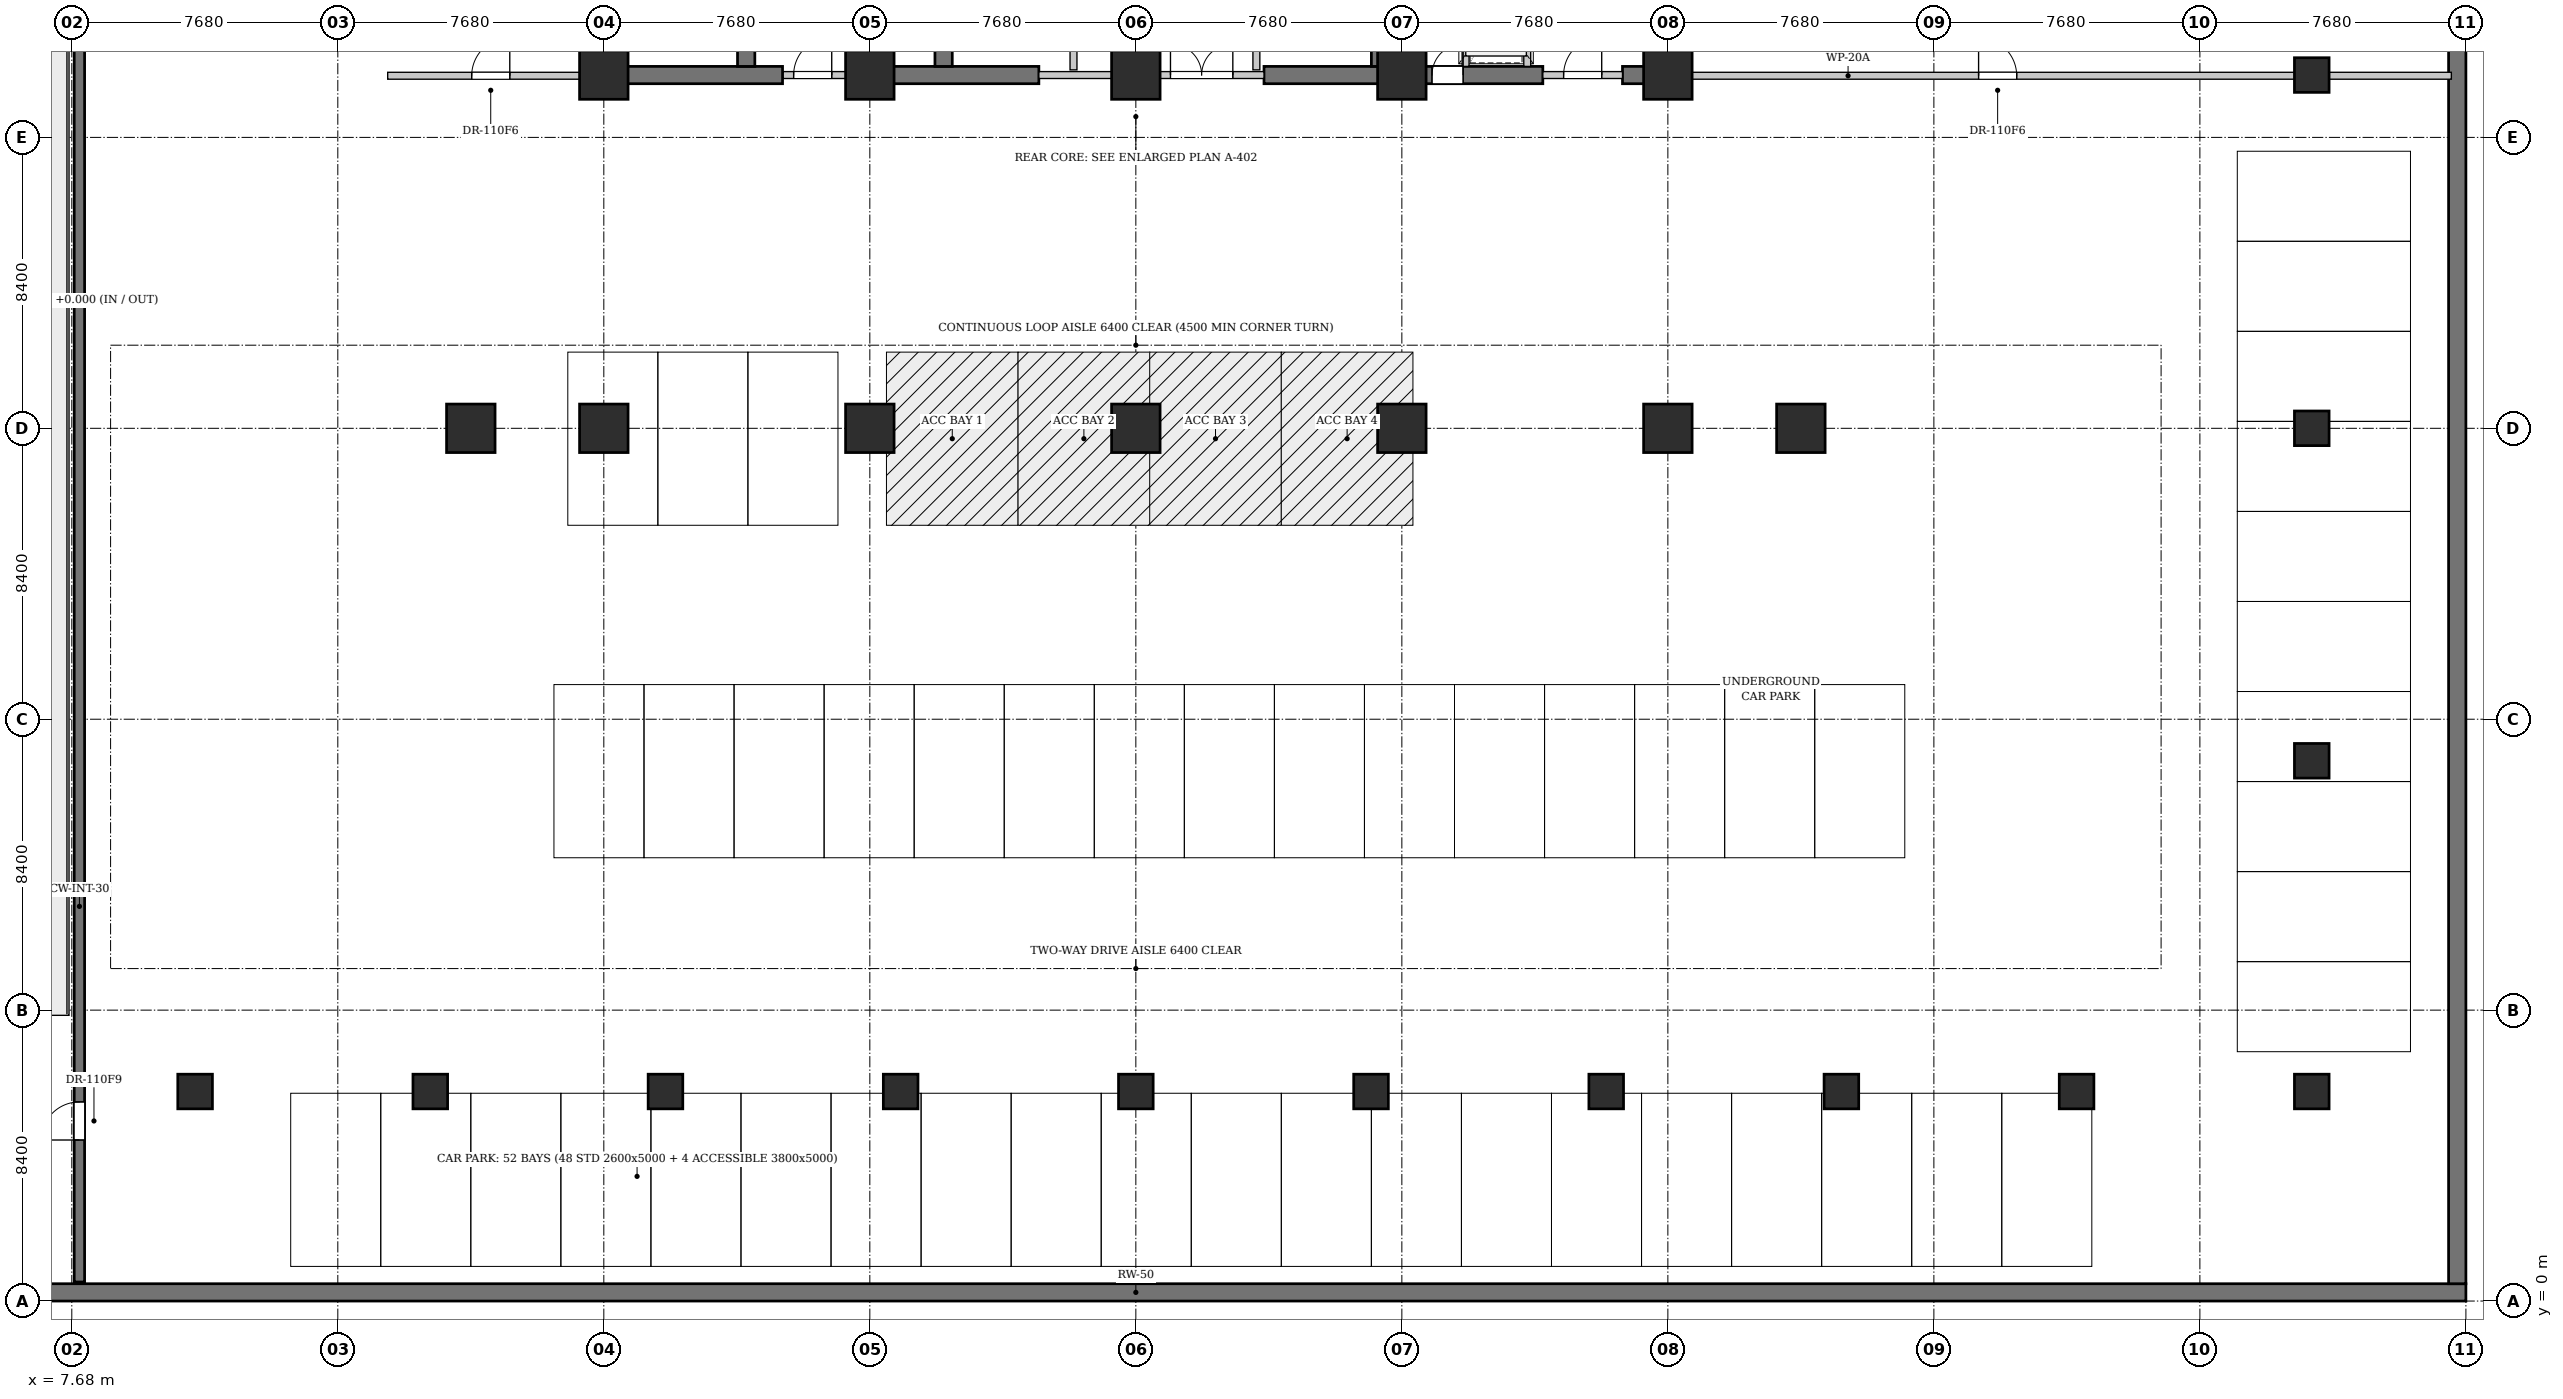
"""IFC4 building model, lengths in metres.
Left out: names, types, materials, properties, quantities, classifications, styles, units other than length and angle.
Written with IfcOpenShell. Run it as: python <this file> out.ifc"""

import sys

from ifc_helpers import new_model, si_unit, direction, frame, frame_2d, origin, origin_2d, place, context, subcontext, project, spatial, rectangle, extrude, element, fill, save


model = new_model("IFC4")
c1 = context("Model", 3, precision=1e-05, world=origin(), true_north=direction((0.0, 1.0)))
c2 = subcontext(c1, "Body", "Model", "MODEL_VIEW")
j1 = project(units=[si_unit("LENGTHUNIT", "METRE"), si_unit("PLANEANGLEUNIT", "RADIAN")], contexts=[c1])
p1 = place(None, origin())
s1 = spatial("IfcSite", under=j1, at=p1, CompositionType="ELEMENT")
p2 = place(p1, origin())
s2 = spatial("IfcBuilding", under=s1, at=p2, CompositionType="ELEMENT")
p3 = place(p2, frame((0.0, 0.0, -5.0)))
s3 = spatial("IfcBuildingStorey", under=s2, at=p3, CompositionType="ELEMENT", Elevation=-5.0)
p4 = place(p3, frame((0.0, 0.25, 0.0), z_axis=(0.0, 0.0, 1.0), x_axis=(1.0, 0.0, 0.0)))
e1 = element("IfcWall", 1, at=p4, inside=s3, PredefinedType="USERDEFINED", context=c2, shape_type="SweptSolid", body=[
    extrude(rectangle(XDim=76.8, YDim=0.5, at=frame_2d((38.4, 0.0))), origin(), (0.0, 0.0, 1.0), 4.65),
])
p5 = place(p3, frame((76.55, 0.5, 0.0), z_axis=(0.0, 0.0, 1.0), x_axis=(0.0, 1.0, 0.0)))
e2 = element("IfcWall", 2, at=p5, inside=s3, PredefinedType="USERDEFINED", context=c2, shape_type="SweptSolid", body=[
    extrude(rectangle(XDim=49.4, YDim=0.5, at=frame_2d((24.7, 0.0))), origin(), (0.0, 0.0, 1.0), 4.65),
])
p6 = place(p3, frame((22.79, 35.4, 0.0), z_axis=(0.0, 0.0, 1.0), x_axis=(1.0, 0.0, 0.0)))
e3 = element("IfcWall", 3, at=p6, inside=s3, PredefinedType="SHEAR", context=c2, shape_type="SweptSolid", body=[
    extrude(rectangle(XDim=5.41, YDim=0.5, at=frame_2d((2.705, 0.0))), origin(), (0.0, 0.0, 1.0), 4.65),
])
p7 = place(p3, frame((30.72, 35.4, 0.0), z_axis=(0.0, 0.0, 1.0), x_axis=(1.0, 0.0, 0.0)))
e4 = element("IfcWall", 4, at=p7, inside=s3, PredefinedType="SHEAR", context=c2, shape_type="SweptSolid", body=[
    extrude(rectangle(XDim=4.88, YDim=0.5, at=frame_2d((2.44, 0.0))), origin(), (0.0, 0.0, 1.0), 4.65),
])
p8 = place(p3, frame((42.1, 35.4, 0.0), z_axis=(0.0, 0.0, 1.0), x_axis=(1.0, 0.0, 0.0)))
e5 = element("IfcWall", 5, at=p8, inside=s3, PredefinedType="SHEAR", context=c2, shape_type="SweptSolid", body=[
    extrude(rectangle(XDim=8.05, YDim=0.5, at=frame_2d((4.025, 0.0))), origin(), (0.0, 0.0, 1.0), 4.65),
])
p9 = place(p8, frame((4.85, 0.0, 0.0)))
e6 = element("IfcOpeningElement", 6, at=p9, cuts=e5, PredefinedType="OPENING", context=c2, shape_type="SweptSolid", body=[
    extrude(rectangle(XDim=0.9, YDim=2.15, at=frame_2d((0.45, 1.075))), frame((0.0, 0.26, 0.0), z_axis=(0.0, -1.0, 0.0), x_axis=(1.0, 0.0, 0.0)), (0.0, 0.0, 1.0), 0.52),
])
p10 = place(p3, frame((52.45, 35.4, 0.0), z_axis=(0.0, 0.0, 1.0), x_axis=(1.0, 0.0, 0.0)))
e7 = element("IfcWall", 7, at=p10, inside=s3, PredefinedType="SHEAR", context=c2, shape_type="SweptSolid", body=[
    extrude(rectangle(XDim=1.56, YDim=0.5, at=frame_2d((0.78, 0.0))), origin(), (0.0, 0.0, 1.0), 4.65),
])
p11 = place(p3, frame((23.04, 35.65, 0.0), z_axis=(0.0, 0.0, 1.0), x_axis=(0.0, 1.0, 0.0)))
e8 = element("IfcWall", 8, at=p11, inside=s3, PredefinedType="SHEAR", context=c2, shape_type="SweptSolid", body=[
    extrude(rectangle(XDim=10.3, YDim=0.5, at=frame_2d((5.15, 0.0))), origin(), (0.0, 0.0, 1.0), 4.65),
])
p12 = place(p3, frame((27.15, 35.65, 0.0), z_axis=(0.0, 0.0, 1.0), x_axis=(0.0, 1.0, 0.0)))
e9 = element("IfcWall", 9, at=p12, inside=s3, PredefinedType="SHEAR", context=c2, shape_type="SweptSolid", body=[
    extrude(rectangle(XDim=10.3, YDim=0.5, at=frame_2d((5.15, 0.0))), origin(), (0.0, 0.0, 1.0), 4.65),
])
p13 = place(p12, frame((0.65, 0.0, 0.0)))
e10 = element("IfcOpeningElement", 10, at=p13, cuts=e9, PredefinedType="OPENING", context=c2, shape_type="SweptSolid", body=[
    extrude(rectangle(XDim=1.1, YDim=2.15, at=frame_2d((0.55, 1.075))), frame((0.0, 0.26, 0.0), z_axis=(0.0, -1.0, 0.0), x_axis=(1.0, 0.0, 0.0)), (0.0, 0.0, 1.0), 0.52),
])
for number, where, z_axis, x_axis in (
    (11, (32.85, 35.65, 0.0), (0.0, 0.0, 1.0), (0.0, 1.0, 0.0)),
    (12, (45.45, 35.65, 0.0), (0.0, 0.0, 1.0), (0.0, 1.0, 0.0)),
    (13, (53.76, 35.65, 0.0), (0.0, 0.0, 1.0), (0.0, 1.0, 0.0)),
):
    element("IfcWall", number, at=place(p3, frame(where, z_axis=z_axis, x_axis=x_axis)), inside=s3, PredefinedType="SHEAR", context=c2, shape_type="SweptSolid", body=[
        extrude(rectangle(XDim=10.3, YDim=0.5, at=frame_2d((5.15, 0.0))), origin(), (0.0, 0.0, 1.0), 4.65),
    ])
p14 = place(p3, frame((7.9, 0.55, 0.0), z_axis=(0.0, 0.0, 1.0), x_axis=(0.0, 1.0, 0.0)))
e14 = element("IfcWall", 14, at=p14, inside=s3, PredefinedType="SHEAR", context=c2, shape_type="SweptSolid", body=[
    extrude(rectangle(XDim=49.3, YDim=0.3, at=frame_2d((24.65, 0.0))), origin(), (0.0, 0.0, 1.0), 4.65),
])
p15 = place(p14, frame((4.1, 0.0, 0.0)))
e15 = element("IfcOpeningElement", 15, at=p15, cuts=e14, PredefinedType="OPENING", context=c2, shape_type="SweptSolid", body=[
    extrude(rectangle(XDim=1.1, YDim=2.15, at=frame_2d((0.55, 1.075))), frame((0.0, 0.16, 0.0), z_axis=(0.0, -1.0, 0.0), x_axis=(1.0, 0.0, 0.0)), (0.0, 0.0, 1.0), 0.32),
])
for number, where, z_axis, x_axis in (
    (16, (23.04, 35.4, 0.0), (0.0, 0.0, 1.0), (1.0, 0.0, 0.0)),
    (17, (23.04, 25.2, 0.0), (0.0, 0.0, 1.0), (1.0, 0.0, 0.0)),
    (18, (30.72, 35.4, 0.0), (0.0, 0.0, 1.0), (1.0, 0.0, 0.0)),
    (19, (30.72, 25.2, 0.0), (0.0, 0.0, 1.0), (1.0, 0.0, 0.0)),
    (20, (38.4, 35.4, 0.0), (0.0, 0.0, 1.0), (1.0, 0.0, 0.0)),
    (21, (38.4, 25.2, 0.0), (0.0, 0.0, 1.0), (1.0, 0.0, 0.0)),
    (22, (46.08, 35.4, 0.0), (0.0, 0.0, 1.0), (1.0, 0.0, 0.0)),
    (23, (46.08, 25.2, 0.0), (0.0, 0.0, 1.0), (1.0, 0.0, 0.0)),
    (24, (53.76, 35.4, 0.0), (0.0, 0.0, 1.0), (1.0, 0.0, 0.0)),
    (25, (53.76, 25.2, 0.0), (0.0, 0.0, 1.0), (1.0, 0.0, 0.0)),
    (26, (19.2, 25.2, 0.0), (0.0, 0.0, 1.0), (1.0, 0.0, 0.0)),
    (27, (57.6, 25.2, 0.0), (0.0, 0.0, 1.0), (1.0, 0.0, 0.0)),
):
    element("IfcColumn", number, at=place(p3, frame(where, z_axis=z_axis, x_axis=x_axis)), inside=s3, PredefinedType="COLUMN", context=c2, shape_type="SweptSolid", body=[
        extrude(rectangle(XDim=1.4, YDim=1.4, at=origin_2d()), origin(), (0.0, 0.0, 1.0), 5.0),
    ])
for number, where, z_axis, x_axis in (
    (28, (11.24, 6.05, 0.0), (0.0, 0.0, 1.0), (1.0, 0.0, 0.0)),
    (29, (18.03, 6.05, 0.0), (0.0, 0.0, 1.0), (1.0, 0.0, 0.0)),
    (30, (24.82, 6.05, 0.0), (0.0, 0.0, 1.0), (1.0, 0.0, 0.0)),
    (31, (31.61, 6.05, 0.0), (0.0, 0.0, 1.0), (1.0, 0.0, 0.0)),
    (32, (38.4, 6.05, 0.0), (0.0, 0.0, 1.0), (1.0, 0.0, 0.0)),
    (33, (45.19, 6.05, 0.0), (0.0, 0.0, 1.0), (1.0, 0.0, 0.0)),
    (34, (51.98, 6.05, 0.0), (0.0, 0.0, 1.0), (1.0, 0.0, 0.0)),
    (35, (58.77, 6.05, 0.0), (0.0, 0.0, 1.0), (1.0, 0.0, 0.0)),
    (36, (65.56, 6.05, 0.0), (0.0, 0.0, 1.0), (1.0, 0.0, 0.0)),
    (37, (72.35, 6.05, 0.0), (0.0, 0.0, 1.0), (1.0, 0.0, 0.0)),
    (38, (72.35, 15.6, 0.0), (0.0, 0.0, 1.0), (1.0, 0.0, 0.0)),
    (39, (72.35, 25.2, 0.0), (0.0, 0.0, 1.0), (1.0, 0.0, 0.0)),
    (40, (72.35, 35.4, 0.0), (0.0, 0.0, 1.0), (1.0, 0.0, 0.0)),
):
    element("IfcColumn", number, at=place(p3, frame(where, z_axis=z_axis, x_axis=x_axis)), inside=s3, PredefinedType="COLUMN", context=c2, shape_type="SweptSolid", body=[
        extrude(rectangle(XDim=1.0, YDim=1.0, at=origin_2d()), origin(), (0.0, 0.0, 1.0), 5.0),
    ])
p16 = place(p3, frame((28.22, 35.4, 0.0), z_axis=(0.0, 0.0, 1.0), x_axis=(1.0, 0.0, 0.0)))
e41 = element("IfcWall", 41, at=p16, inside=s3, PredefinedType="PARTITIONING", context=c2, shape_type="SweptSolid", body=[
    extrude(rectangle(XDim=2.5, YDim=0.2, at=frame_2d((1.25, 0.0))), origin(), (0.0, 0.0, 1.0), 3.845),
])
p17 = place(p16, frame((0.3, 0.0, 0.0)))
e42 = element("IfcOpeningElement", 42, at=p17, cuts=e41, PredefinedType="OPENING", context=c2, shape_type="SweptSolid", body=[
    extrude(rectangle(XDim=1.1, YDim=2.15, at=frame_2d((0.55, 1.075))), frame((0.0, 0.11, 0.0), z_axis=(0.0, -1.0, 0.0), x_axis=(1.0, 0.0, 0.0)), (0.0, 0.0, 1.0), 0.22),
])
p18 = place(p3, frame((35.6, 35.4, 0.0), z_axis=(0.0, 0.0, 1.0), x_axis=(1.0, 0.0, 0.0)))
e43 = element("IfcWall", 43, at=p18, inside=s3, PredefinedType="PARTITIONING", context=c2, shape_type="SweptSolid", body=[
    extrude(rectangle(XDim=6.5, YDim=0.2, at=frame_2d((3.25, 0.0))), origin(), (0.0, 0.0, 1.0), 3.845),
])
p19 = place(p18, frame((3.8, 0.0, 0.0)))
e44 = element("IfcOpeningElement", 44, at=p19, cuts=e43, PredefinedType="OPENING", context=c2, shape_type="SweptSolid", body=[
    extrude(rectangle(XDim=1.8, YDim=2.3, at=frame_2d((0.9, 1.15))), frame((0.0, 0.11, 0.0), z_axis=(0.0, -1.0, 0.0), x_axis=(1.0, 0.0, 0.0)), (0.0, 0.0, 1.0), 0.22),
])
p20 = place(p3, frame((36.6, 35.55, 0.0), z_axis=(0.0, 0.0, 1.0), x_axis=(0.0, 1.0, 0.0)))
e45 = element("IfcWall", 45, at=p20, inside=s3, PredefinedType="PARTITIONING", context=c2, shape_type="SweptSolid", body=[
    extrude(rectangle(XDim=10.37, YDim=0.2, at=frame_2d((5.185, 0.0))), origin(), (0.0, 0.0, 1.0), 4.65),
])
p21 = place(p3, frame((41.88, 35.55, 0.0), z_axis=(0.0, 0.0, 1.0), x_axis=(0.0, 1.0, 0.0)))
e46 = element("IfcWall", 46, at=p21, inside=s3, PredefinedType="PARTITIONING", context=c2, shape_type="SweptSolid", body=[
    extrude(rectangle(XDim=7.1, YDim=0.2, at=frame_2d((3.55, 0.0))), origin(), (0.0, 0.0, 1.0), 4.65),
])
p22 = place(p21, frame((2.8, 0.0, 0.0)))
e47 = element("IfcOpeningElement", 47, at=p22, cuts=e46, PredefinedType="OPENING", context=c2, shape_type="SweptSolid", body=[
    extrude(rectangle(XDim=0.9, YDim=2.15, at=frame_2d((0.45, 1.075))), frame((0.0, 0.11, 0.0), z_axis=(0.0, -1.0, 0.0), x_axis=(1.0, 0.0, 0.0)), (0.0, 0.0, 1.0), 0.22),
])
p23 = place(p3, frame((50.15, 35.4, 0.0), z_axis=(0.0, 0.0, 1.0), x_axis=(1.0, 0.0, 0.0)))
e48 = element("IfcWall", 48, at=p23, inside=s3, PredefinedType="PARTITIONING", context=c2, shape_type="SweptSolid", body=[
    extrude(rectangle(XDim=2.3, YDim=0.2, at=frame_2d((1.15, 0.0))), origin(), (0.0, 0.0, 1.0), 3.845),
])
p24 = place(p23, frame((0.6, 0.0, 0.0)))
e49 = element("IfcOpeningElement", 49, at=p24, cuts=e48, PredefinedType="OPENING", context=c2, shape_type="SweptSolid", body=[
    extrude(rectangle(XDim=1.1, YDim=2.15, at=frame_2d((0.55, 1.075))), frame((0.0, 0.11, 0.0), z_axis=(0.0, -1.0, 0.0), x_axis=(1.0, 0.0, 0.0)), (0.0, 0.0, 1.0), 0.22),
])
p25 = place(p3, frame((49.7, 35.65, 0.0), z_axis=(0.0, 0.0, 1.0), x_axis=(0.0, 1.0, 0.0)))
e50 = element("IfcWall", 50, at=p25, inside=s3, PredefinedType="PARTITIONING", context=c2, shape_type="SweptSolid", body=[
    extrude(rectangle(XDim=3.15, YDim=0.2, at=frame_2d((1.575, 0.0))), origin(), (0.0, 0.0, 1.0), 4.65),
])
p26 = place(p25, frame((0.85, 0.0, 0.0)))
e51 = element("IfcOpeningElement", 51, at=p26, cuts=e50, PredefinedType="OPENING", context=c2, shape_type="SweptSolid", body=[
    extrude(rectangle(XDim=1.2, YDim=2.2, at=frame_2d((0.6, 1.1))), frame((0.0, 0.11, 0.0), z_axis=(0.0, -1.0, 0.0), x_axis=(1.0, 0.0, 0.0)), (0.0, 0.0, 1.0), 0.22),
])
p27 = place(p3, frame((47.92, 35.65, 0.0), z_axis=(0.0, 0.0, 1.0), x_axis=(0.0, 1.0, 0.0)))
e52 = element("IfcWall", 52, at=p27, inside=s3, PredefinedType="PARTITIONING", context=c2, shape_type="SweptSolid", body=[
    extrude(rectangle(XDim=3.15, YDim=0.2, at=frame_2d((1.575, 0.0))), origin(), (0.0, 0.0, 1.0), 4.65),
])
p28 = place(p3, frame((16.8, 35.38, 0.0), z_axis=(0.0, 0.0, 1.0), x_axis=(1.0, 0.0, 0.0)))
e53 = element("IfcWall", 53, at=p28, inside=s3, PredefinedType="PARTITIONING", context=c2, shape_type="SweptSolid", body=[
    extrude(rectangle(XDim=5.95, YDim=0.2, at=frame_2d((2.975, 0.0))), origin(), (0.0, 0.0, 1.0), 4.65),
])
p29 = place(p28, frame((2.425, 0.0, 0.0)))
e54 = element("IfcOpeningElement", 54, at=p29, cuts=e53, PredefinedType="OPENING", context=c2, shape_type="SweptSolid", body=[
    extrude(rectangle(XDim=1.1, YDim=2.15, at=frame_2d((0.55, 1.075))), frame((0.0, 0.11, 0.0), z_axis=(0.0, -1.0, 0.0), x_axis=(1.0, 0.0, 0.0)), (0.0, 0.0, 1.0), 0.22),
])
p30 = place(p3, frame((54.05, 35.38, 0.0), z_axis=(0.0, 0.0, 1.0), x_axis=(1.0, 0.0, 0.0)))
e55 = element("IfcWall", 55, at=p30, inside=s3, PredefinedType="PARTITIONING", context=c2, shape_type="SweptSolid", body=[
    extrude(rectangle(XDim=22.33, YDim=0.2, at=frame_2d((11.165, 0.0))), origin(), (0.0, 0.0, 1.0), 3.845),
])
p31 = place(p30, frame((8.681, 0.0, 0.0)))
e56 = element("IfcOpeningElement", 56, at=p31, cuts=e55, PredefinedType="OPENING", context=c2, shape_type="SweptSolid", body=[
    extrude(rectangle(XDim=1.1, YDim=2.15, at=frame_2d((0.55, 1.075))), frame((0.0, 0.11, 0.0), z_axis=(0.0, -1.0, 0.0), x_axis=(1.0, 0.0, 0.0)), (0.0, 0.0, 1.0), 0.22),
])
p32 = place(p17, origin())
e57 = element("IfcDoor", 57, at=p32, inside=s3, OperationType="SINGLE_SWING_RIGHT", PredefinedType="DOOR", context=c2, shape_type="SweptSolid", body=[
    extrude(rectangle(XDim=1.1, YDim=2.15, at=frame_2d((0.55, 1.075))), frame((0.0, 0.025, 0.0), z_axis=(0.0, -1.0, 0.0), x_axis=(1.0, 0.0, 0.0)), (0.0, 0.0, 1.0), 0.05),
])
fill(e42, e57)
p33 = place(p19, origin())
e58 = element("IfcDoor", 58, at=p33, inside=s3, OperationType="DOUBLE_DOOR_SINGLE_SWING", PredefinedType="DOOR", context=c2, shape_type="SweptSolid", body=[
    extrude(rectangle(XDim=1.8, YDim=2.3, at=frame_2d((0.9, 1.15))), frame((0.0, 0.025, 0.0), z_axis=(0.0, -1.0, 0.0), x_axis=(1.0, 0.0, 0.0)), (0.0, 0.0, 1.0), 0.05),
])
fill(e44, e58)
p34 = place(p24, origin())
e59 = element("IfcDoor", 59, at=p34, inside=s3, OperationType="SINGLE_SWING_RIGHT", PredefinedType="DOOR", context=c2, shape_type="SweptSolid", body=[
    extrude(rectangle(XDim=1.1, YDim=2.15, at=frame_2d((0.55, 1.075))), frame((0.0, 0.025, 0.0), z_axis=(0.0, -1.0, 0.0), x_axis=(1.0, 0.0, 0.0)), (0.0, 0.0, 1.0), 0.05),
])
fill(e49, e59)
p35 = place(p29, origin())
e60 = element("IfcDoor", 60, at=p35, inside=s3, OperationType="SINGLE_SWING_RIGHT", PredefinedType="DOOR", context=c2, shape_type="SweptSolid", body=[
    extrude(rectangle(XDim=1.1, YDim=2.15, at=frame_2d((0.55, 1.075))), frame((0.0, 0.025, 0.0), z_axis=(0.0, -1.0, 0.0), x_axis=(1.0, 0.0, 0.0)), (0.0, 0.0, 1.0), 0.05),
])
fill(e54, e60)
p36 = place(p31, origin())
e61 = element("IfcDoor", 61, at=p36, inside=s3, OperationType="SINGLE_SWING_LEFT", PredefinedType="DOOR", context=c2, shape_type="SweptSolid", body=[
    extrude(rectangle(XDim=1.1, YDim=2.15, at=frame_2d((0.55, 1.075))), frame((0.0, 0.025, 0.0), z_axis=(0.0, -1.0, 0.0), x_axis=(1.0, 0.0, 0.0)), (0.0, 0.0, 1.0), 0.05),
])
fill(e56, e61)
p37 = place(p9, origin())
e62 = element("IfcDoor", 62, at=p37, inside=s3, OperationType="SINGLE_SWING_RIGHT", PredefinedType="DOOR", context=c2, shape_type="SweptSolid", body=[
    extrude(rectangle(XDim=0.9, YDim=2.15, at=frame_2d((0.45, 1.075))), frame((0.0, 0.025, 0.0), z_axis=(0.0, -1.0, 0.0), x_axis=(1.0, 0.0, 0.0)), (0.0, 0.0, 1.0), 0.05),
])
fill(e6, e62)
p38 = place(p15, origin())
e63 = element("IfcDoor", 63, at=p38, inside=s3, OperationType="SINGLE_SWING_LEFT", PredefinedType="DOOR", context=c2, shape_type="SweptSolid", body=[
    extrude(rectangle(XDim=1.1, YDim=2.15, at=frame_2d((0.55, 1.075))), frame((0.0, 0.025, 0.0), z_axis=(0.0, -1.0, 0.0), x_axis=(1.0, 0.0, 0.0)), (0.0, 0.0, 1.0), 0.05),
])
fill(e15, e63)
save(model, sys.argv[1])
